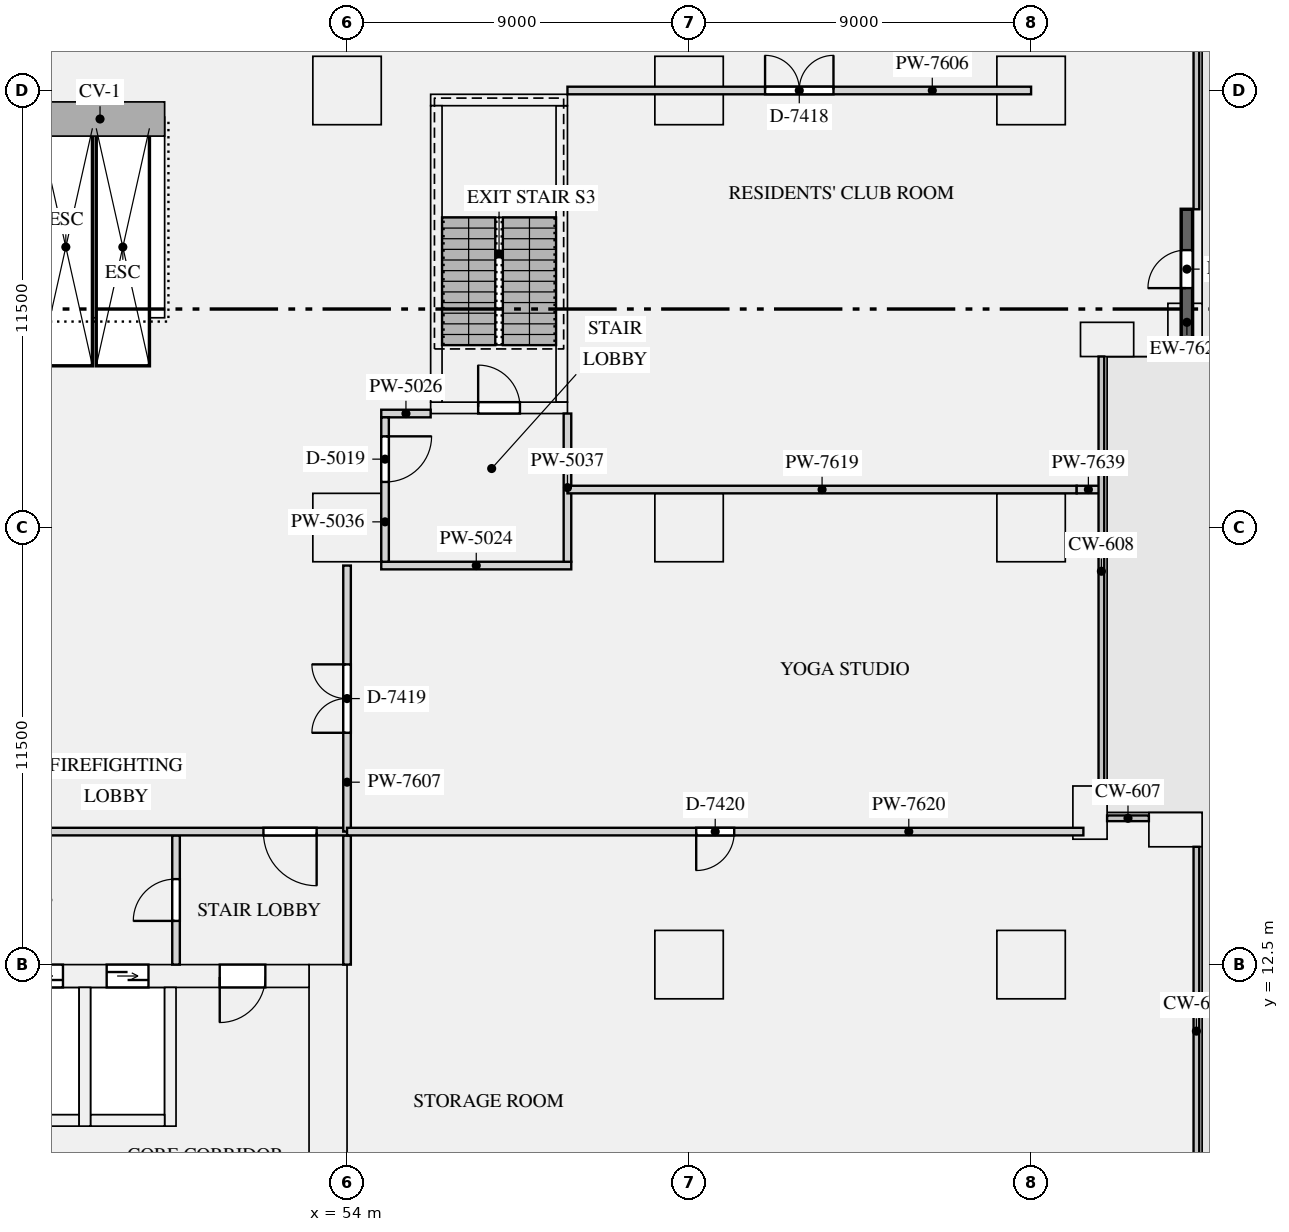
"""IFC4 building model, lengths in metres.
Left out: names, types, materials, properties, quantities, classifications, styles, units other than length and angle.
Written with IfcOpenShell. Run it as: python <this file> out.ifc"""

import sys

from ifc_helpers import new_model, si_unit, direction, frame, frame_2d, origin, origin_2d, place, context, subcontext, project, spatial, rectangle, extrude, element, fill, save


model = new_model("IFC4")
c1 = context("Model", 3, precision=1e-05, world=origin(), true_north=direction((0.0, 1.0)))
c2 = subcontext(c1, "Body", "Model", "MODEL_VIEW")
j1 = project(units=[si_unit("LENGTHUNIT", "METRE"), si_unit("PLANEANGLEUNIT", "RADIAN")], contexts=[c1])
p1 = place(None, origin())
s1 = spatial("IfcSite", under=j1, at=p1, CompositionType="ELEMENT")
p2 = place(p1, origin())
s2 = spatial("IfcBuilding", under=s1, at=p2, CompositionType="ELEMENT")
p3 = place(p2, frame((0.0, 0.0, 11.0)))
s3 = spatial("IfcBuildingStorey", under=s2, at=p3, CompositionType="ELEMENT", Elevation=11.0)
for number, where, z_axis, x_axis in (
    (1, (75.8, 16.05, 0.0), (0.0, 0.0, 1.0), (-1.0, 0.0, 0.0)),
    (2, (73.55, 16.5, 0.0), (0.0, 0.0, 1.0), (0.0, 1.0, 0.0)),
    (3, (74.0, 28.95, 0.0), (0.0, 0.0, 1.0), (1.0, 0.0, 0.0)),
    (4, (76.05, 29.2, 0.0), (0.0, 0.0, 1.0), (0.0, 1.0, 0.0)),
):
    element("IfcColumn", number, at=place(p3, frame(where, z_axis=z_axis, x_axis=x_axis)), inside=s3, PredefinedType="USERDEFINED", context=c2, shape_type="SweptSolid", body=[
        extrude(rectangle(XDim=1.4, YDim=0.9, at=origin_2d()), origin(), (0.0, 0.0, 1.0), 4.5),
    ])
for number, where, z_axis, x_axis in (
    (5, (54.0, 24.0, 0.0), (0.0, 0.0, 1.0), (1.0, 0.0, 0.0)),
    (6, (54.0, 35.5, 0.0), (0.0, 0.0, 1.0), (1.0, 0.0, 0.0)),
    (7, (63.0, 12.5, 0.0), (0.0, 0.0, 1.0), (1.0, 0.0, 0.0)),
    (8, (63.0, 24.0, 0.0), (0.0, 0.0, 1.0), (1.0, 0.0, 0.0)),
    (9, (63.0, 35.5, 0.0), (0.0, 0.0, 1.0), (1.0, 0.0, 0.0)),
    (10, (72.0, 12.5, 0.0), (0.0, 0.0, 1.0), (1.0, 0.0, 0.0)),
    (11, (72.0, 24.0, 0.0), (0.0, 0.0, 1.0), (1.0, 0.0, 0.0)),
    (12, (72.0, 35.5, 0.0), (0.0, 0.0, 1.0), (1.0, 0.0, 0.0)),
):
    element("IfcColumn", number, at=place(p3, frame(where, z_axis=z_axis, x_axis=x_axis)), inside=s3, PredefinedType="COLUMN", context=c2, shape_type="SweptSolid", body=[
        extrude(rectangle(XDim=1.8, YDim=1.8, at=origin_2d()), origin(), (0.0, 0.0, 1.0), 4.5),
    ])
p4 = place(p3, frame((53.5, 0.0, 0.0), z_axis=(0.0, 0.0, 1.0), x_axis=(0.0, 1.0, 0.0)))
e13 = element("IfcWall", 13, at=p4, inside=s3, PredefinedType="SHEAR", context=c2, shape_type="SweptSolid", body=[
    extrude(rectangle(XDim=12.5, YDim=1.0, at=frame_2d((6.25, 0.0))), origin(), (0.0, 0.0, 1.0), 4.5),
])
p5 = place(p3, frame((19.0, 12.2, 0.0), z_axis=(0.0, 0.0, 1.0), x_axis=(1.0, 0.0, 0.0)))
e14 = element("IfcWall", 14, at=p5, inside=s3, PredefinedType="SHEAR", context=c2, shape_type="SweptSolid", body=[
    extrude(rectangle(XDim=34.0, YDim=0.6, at=frame_2d((17.0, 0.0))), origin(), (0.0, 0.0, 1.0), 4.5),
])
p6 = place(p5, frame((4.475, 0.0, 0.0)))
e15 = element("IfcOpeningElement", 15, at=p6, cuts=e14, PredefinedType="OPENING", context=c2, shape_type="SweptSolid", body=[
    extrude(rectangle(XDim=1.2, YDim=2.1, at=frame_2d((0.6, 1.05))), frame((0.0, 0.31, 0.0), z_axis=(0.0, -1.0, 0.0), x_axis=(1.0, 0.0, 0.0)), (0.0, 0.0, 1.0), 0.62),
])
p7 = place(p5, frame((7.325, 0.0, 0.0)))
e16 = element("IfcOpeningElement", 16, at=p7, cuts=e14, PredefinedType="OPENING", context=c2, shape_type="SweptSolid", body=[
    extrude(rectangle(XDim=1.2, YDim=2.1, at=frame_2d((0.6, 1.05))), frame((0.0, 0.31, 0.0), z_axis=(0.0, -1.0, 0.0), x_axis=(1.0, 0.0, 0.0)), (0.0, 0.0, 1.0), 0.62),
])
p8 = place(p5, frame((10.175, 0.0, 0.0)))
e17 = element("IfcOpeningElement", 17, at=p8, cuts=e14, PredefinedType="OPENING", context=c2, shape_type="SweptSolid", body=[
    extrude(rectangle(XDim=1.2, YDim=2.1, at=frame_2d((0.6, 1.05))), frame((0.0, 0.31, 0.0), z_axis=(0.0, -1.0, 0.0), x_axis=(1.0, 0.0, 0.0)), (0.0, 0.0, 1.0), 0.62),
])
p9 = place(p5, frame((13.025, 0.0, 0.0)))
e18 = element("IfcOpeningElement", 18, at=p9, cuts=e14, PredefinedType="OPENING", context=c2, shape_type="SweptSolid", body=[
    extrude(rectangle(XDim=1.2, YDim=2.1, at=frame_2d((0.6, 1.05))), frame((0.0, 0.31, 0.0), z_axis=(0.0, -1.0, 0.0), x_axis=(1.0, 0.0, 0.0)), (0.0, 0.0, 1.0), 0.62),
])
p10 = place(p5, frame((15.875, 0.0, 0.0)))
e19 = element("IfcOpeningElement", 19, at=p10, cuts=e14, PredefinedType="OPENING", context=c2, shape_type="SweptSolid", body=[
    extrude(rectangle(XDim=1.2, YDim=2.1, at=frame_2d((0.6, 1.05))), frame((0.0, 0.31, 0.0), z_axis=(0.0, -1.0, 0.0), x_axis=(1.0, 0.0, 0.0)), (0.0, 0.0, 1.0), 0.62),
])
p11 = place(p5, frame((24.175, 0.0, 0.0)))
e20 = element("IfcOpeningElement", 20, at=p11, cuts=e14, PredefinedType="OPENING", context=c2, shape_type="SweptSolid", body=[
    extrude(rectangle(XDim=1.1, YDim=2.1, at=frame_2d((0.55, 1.05))), frame((0.0, 0.31, 0.0), z_axis=(0.0, -1.0, 0.0), x_axis=(1.0, 0.0, 0.0)), (0.0, 0.0, 1.0), 0.62),
])
p12 = place(p5, frame((26.425, 0.0, 0.0)))
e21 = element("IfcOpeningElement", 21, at=p12, cuts=e14, PredefinedType="OPENING", context=c2, shape_type="SweptSolid", body=[
    extrude(rectangle(XDim=1.1, YDim=2.1, at=frame_2d((0.55, 1.05))), frame((0.0, 0.31, 0.0), z_axis=(0.0, -1.0, 0.0), x_axis=(1.0, 0.0, 0.0)), (0.0, 0.0, 1.0), 0.62),
])
p13 = place(p5, frame((28.675, 0.0, 0.0)))
e22 = element("IfcOpeningElement", 22, at=p13, cuts=e14, PredefinedType="OPENING", context=c2, shape_type="SweptSolid", body=[
    extrude(rectangle(XDim=1.1, YDim=2.1, at=frame_2d((0.55, 1.05))), frame((0.0, 0.31, 0.0), z_axis=(0.0, -1.0, 0.0), x_axis=(1.0, 0.0, 0.0)), (0.0, 0.0, 1.0), 0.62),
])
p14 = place(p5, frame((1.15, 0.0, 0.0)))
e23 = element("IfcOpeningElement", 23, at=p14, cuts=e14, PredefinedType="OPENING", context=c2, shape_type="SweptSolid", body=[
    extrude(rectangle(XDim=1.2, YDim=2.1, at=frame_2d((0.6, 1.05))), frame((0.0, 0.31, 0.0), z_axis=(0.0, -1.0, 0.0), x_axis=(1.0, 0.0, 0.0)), (0.0, 0.0, 1.0), 0.62),
])
p15 = place(p5, frame((31.65, 0.0, 0.0)))
e24 = element("IfcOpeningElement", 24, at=p15, cuts=e14, PredefinedType="OPENING", context=c2, shape_type="SweptSolid", body=[
    extrude(rectangle(XDim=1.2, YDim=2.1, at=frame_2d((0.6, 1.05))), frame((0.0, 0.31, 0.0), z_axis=(0.0, -1.0, 0.0), x_axis=(1.0, 0.0, 0.0)), (0.0, 0.0, 1.0), 0.62),
])
for number, where, z_axis, x_axis in (
    (25, (45.0, 8.4, 0.0), (0.0, 0.0, 1.0), (1.0, 0.0, 0.0)),
    (26, (47.25, 8.4, 0.0), (0.0, 0.0, 1.0), (1.0, 0.0, 0.0)),
):
    element("IfcWall", number, at=place(p3, frame(where, z_axis=z_axis, x_axis=x_axis)), inside=s3, PredefinedType="SHEAR", context=c2, shape_type="SweptSolid", body=[
        extrude(rectangle(XDim=1.95, YDim=0.3, at=frame_2d((0.975, 0.0))), origin(), (0.0, 0.0, 1.0), 4.5),
    ])
for number, where, z_axis, x_axis in (
    (27, (47.1, 8.25, 0.0), (0.0, 0.0, 1.0), (0.0, 1.0, 0.0)),
    (28, (49.35, 8.25, 0.0), (0.0, 0.0, 1.0), (0.0, 1.0, 0.0)),
):
    element("IfcWall", number, at=place(p3, frame(where, z_axis=z_axis, x_axis=x_axis)), inside=s3, PredefinedType="SHEAR", context=c2, shape_type="SweptSolid", body=[
        extrude(rectangle(XDim=3.65, YDim=0.3, at=frame_2d((1.825, 0.0))), origin(), (0.0, 0.0, 1.0), 4.5),
    ])
p16 = place(p3, frame((56.2, 27.15, 0.0), z_axis=(0.0, 0.0, 1.0), x_axis=(1.0, 0.0, 0.0)))
e29 = element("IfcWall", 29, at=p16, inside=s3, PredefinedType="SHEAR", context=c2, shape_type="SweptSolid", body=[
    extrude(rectangle(XDim=3.6, YDim=0.3, at=frame_2d((1.8, 0.0))), origin(), (0.0, 0.0, 1.0), 4.5),
])
p17 = place(p16, frame((1.25, 0.0, 0.0)))
e30 = element("IfcOpeningElement", 30, at=p17, cuts=e29, PredefinedType="OPENING", context=c2, shape_type="SweptSolid", body=[
    extrude(rectangle(XDim=1.1, YDim=2.1, at=frame_2d((0.55, 1.05))), frame((0.0, 0.16, 0.0), z_axis=(0.0, -1.0, 0.0), x_axis=(1.0, 0.0, 0.0)), (0.0, 0.0, 1.0), 0.32),
])
p18 = place(p3, frame((56.2, 35.25, 0.0), z_axis=(0.0, 0.0, 1.0), x_axis=(1.0, 0.0, 0.0)))
e31 = element("IfcWall", 31, at=p18, inside=s3, PredefinedType="SHEAR", context=c2, shape_type="SweptSolid", body=[
    extrude(rectangle(XDim=3.6, YDim=0.3, at=frame_2d((1.8, 0.0))), origin(), (0.0, 0.0, 1.0), 4.5),
])
for number, where, z_axis, x_axis in (
    (32, (56.35, 27.3, 0.0), (0.0, 0.0, 1.0), (0.0, 1.0, 0.0)),
    (33, (59.65, 27.3, 0.0), (0.0, 0.0, 1.0), (0.0, 1.0, 0.0)),
):
    element("IfcWall", number, at=place(p3, frame(where, z_axis=z_axis, x_axis=x_axis)), inside=s3, PredefinedType="SHEAR", context=c2, shape_type="SweptSolid", body=[
        extrude(rectangle(XDim=7.8, YDim=0.3, at=frame_2d((3.9, 0.0))), origin(), (0.0, 0.0, 1.0), 4.5),
    ])
p19 = place(p3, frame((54.9, 23.0, 0.0), z_axis=(0.0, 0.0, 1.0), x_axis=(1.0, 0.0, 0.0)))
e34 = element("IfcWall", 34, at=p19, inside=s3, PredefinedType="PARTITIONING", context=c2, shape_type="SweptSolid", body=[
    extrude(rectangle(XDim=5.0, YDim=0.2, at=frame_2d((2.5, 0.0))), origin(), (0.0, 0.0, 1.0), 3.9),
])
p20 = place(p3, frame((54.9, 27.0, 0.0), z_axis=(0.0, 0.0, 1.0), x_axis=(1.0, 0.0, 0.0)))
e35 = element("IfcWall", 35, at=p20, inside=s3, PredefinedType="PARTITIONING", context=c2, shape_type="SweptSolid", body=[
    extrude(rectangle(XDim=1.3, YDim=0.2, at=frame_2d((0.65, 0.0))), origin(), (0.0, 0.0, 1.0), 3.9),
])
p21 = place(p3, frame((49.5, 12.5, 0.0), z_axis=(0.0, 0.0, 1.0), x_axis=(0.0, 1.0, 0.0)))
e36 = element("IfcWall", 36, at=p21, inside=s3, PredefinedType="PARTITIONING", context=c2, shape_type="SweptSolid", body=[
    extrude(rectangle(XDim=3.4, YDim=0.2, at=frame_2d((1.7, 0.0))), origin(), (0.0, 0.0, 1.0), 3.9),
])
p22 = place(p21, frame((1.15, 0.0, 0.0)))
e37 = element("IfcOpeningElement", 37, at=p22, cuts=e36, PredefinedType="OPENING", context=c2, shape_type="SweptSolid", body=[
    extrude(rectangle(XDim=1.1, YDim=2.1, at=frame_2d((0.55, 1.05))), frame((0.0, 0.11, 0.0), z_axis=(0.0, -1.0, 0.0), x_axis=(1.0, 0.0, 0.0)), (0.0, 0.0, 1.0), 0.22),
])
p23 = place(p3, frame((54.0, 12.5, 0.0), z_axis=(0.0, 0.0, 1.0), x_axis=(0.0, 1.0, 0.0)))
e38 = element("IfcWall", 38, at=p23, inside=s3, PredefinedType="PARTITIONING", context=c2, shape_type="SweptSolid", body=[
    extrude(rectangle(XDim=3.4, YDim=0.2, at=frame_2d((1.7, 0.0))), origin(), (0.0, 0.0, 1.0), 3.9),
])
p24 = place(p3, frame((55.0, 23.1, 0.0), z_axis=(0.0, 0.0, 1.0), x_axis=(0.0, 1.0, 0.0)))
e39 = element("IfcWall", 39, at=p24, inside=s3, PredefinedType="PARTITIONING", context=c2, shape_type="SweptSolid", body=[
    extrude(rectangle(XDim=3.8, YDim=0.2, at=frame_2d((1.9, 0.0))), origin(), (0.0, 0.0, 1.0), 3.9),
])
p25 = place(p24, frame((2.1, 0.0, 0.0)))
e40 = element("IfcOpeningElement", 40, at=p25, cuts=e39, PredefinedType="OPENING", context=c2, shape_type="SweptSolid", body=[
    extrude(rectangle(XDim=1.2, YDim=2.1, at=frame_2d((0.6, 1.05))), frame((0.0, 0.11, 0.0), z_axis=(0.0, -1.0, 0.0), x_axis=(1.0, 0.0, 0.0)), (0.0, 0.0, 1.0), 0.22),
])
p26 = place(p3, frame((59.8, 23.1, 0.0), z_axis=(0.0, 0.0, 1.0), x_axis=(0.0, 1.0, 0.0)))
e41 = element("IfcWall", 41, at=p26, inside=s3, PredefinedType="PARTITIONING", context=c2, shape_type="SweptSolid", body=[
    extrude(rectangle(XDim=3.9, YDim=0.2, at=frame_2d((1.95, 0.0))), origin(), (0.0, 0.0, 1.0), 3.9),
])
p27 = place(p3, frame((17.9, 16.0, 0.0), z_axis=(0.0, 0.0, 1.0), x_axis=(1.0, 0.0, 0.0)))
e42 = element("IfcWall", 42, at=p27, inside=s3, PredefinedType="PARTITIONING", context=c2, shape_type="SweptSolid", body=[
    extrude(rectangle(XDim=36.2, YDim=0.2, at=frame_2d((18.1, 0.0))), origin(), (0.0, 0.0, 1.0), 3.9),
])
p28 = place(p27, frame((0.9, 0.0, 0.0)))
e43 = element("IfcOpeningElement", 43, at=p28, cuts=e42, PredefinedType="OPENING", context=c2, shape_type="SweptSolid", body=[
    extrude(rectangle(XDim=1.4, YDim=2.1, at=frame_2d((0.7, 1.05))), frame((0.0, 0.11, 0.0), z_axis=(0.0, -1.0, 0.0), x_axis=(1.0, 0.0, 0.0)), (0.0, 0.0, 1.0), 0.22),
])
p29 = place(p27, frame((33.9, 0.0, 0.0)))
e44 = element("IfcOpeningElement", 44, at=p29, cuts=e42, PredefinedType="OPENING", context=c2, shape_type="SweptSolid", body=[
    extrude(rectangle(XDim=1.4, YDim=2.1, at=frame_2d((0.7, 1.05))), frame((0.0, 0.11, 0.0), z_axis=(0.0, -1.0, 0.0), x_axis=(1.0, 0.0, 0.0)), (0.0, 0.0, 1.0), 0.22),
])
p30 = place(p3, frame((59.8, 35.5, 0.0), z_axis=(0.0, 0.0, 1.0), x_axis=(1.0, 0.0, 0.0)))
e45 = element("IfcWall", 45, at=p30, inside=s3, PredefinedType="PARTITIONING", context=c2, shape_type="SweptSolid", body=[
    extrude(rectangle(XDim=12.2, YDim=0.2, at=frame_2d((6.1, 0.0))), origin(), (0.0, 0.0, 1.0), 3.9),
])
p31 = place(p30, frame((5.2, 0.0, 0.0)))
e46 = element("IfcOpeningElement", 46, at=p31, cuts=e45, PredefinedType="OPENING", context=c2, shape_type="SweptSolid", body=[
    extrude(rectangle(XDim=1.8, YDim=2.4, at=frame_2d((0.9, 1.2))), frame((0.0, 0.11, 0.0), z_axis=(0.0, -1.0, 0.0), x_axis=(1.0, 0.0, 0.0)), (0.0, 0.0, 1.0), 0.22),
])
p32 = place(p3, frame((54.0, 16.0, 0.0), z_axis=(0.0, 0.0, 1.0), x_axis=(0.0, 1.0, 0.0)))
e47 = element("IfcWall", 47, at=p32, inside=s3, PredefinedType="PARTITIONING", context=c2, shape_type="SweptSolid", body=[
    extrude(rectangle(XDim=7.0, YDim=0.2, at=frame_2d((3.5, 0.0))), origin(), (0.0, 0.0, 1.0), 3.9),
])
p33 = place(p32, frame((2.6, 0.0, 0.0)))
e48 = element("IfcOpeningElement", 48, at=p33, cuts=e47, PredefinedType="OPENING", context=c2, shape_type="SweptSolid", body=[
    extrude(rectangle(XDim=1.8, YDim=2.4, at=frame_2d((0.9, 1.2))), frame((0.0, 0.11, 0.0), z_axis=(0.0, -1.0, 0.0), x_axis=(1.0, 0.0, 0.0)), (0.0, 0.0, 1.0), 0.22),
])
p34 = place(p3, frame((59.8, 25.0, 0.0), z_axis=(0.0, 0.0, 1.0), x_axis=(1.0, 0.0, 0.0)))
e49 = element("IfcWall", 49, at=p34, inside=s3, PredefinedType="PARTITIONING", context=c2, shape_type="SweptSolid", body=[
    extrude(rectangle(XDim=13.4, YDim=0.2, at=frame_2d((6.7, 0.0))), origin(), (0.0, 0.0, 1.0), 3.9),
])
p35 = place(p3, frame((54.0, 16.0, 0.0), z_axis=(0.0, 0.0, 1.0), x_axis=(1.0, 0.0, 0.0)))
e50 = element("IfcWall", 50, at=p35, inside=s3, PredefinedType="PARTITIONING", context=c2, shape_type="SweptSolid", body=[
    extrude(rectangle(XDim=19.376, YDim=0.2, at=frame_2d((9.688, 0.0))), origin(), (0.0, 0.0, 1.0), 3.9),
])
p36 = place(p35, frame((9.188, 0.0, 0.0)))
e51 = element("IfcOpeningElement", 51, at=p36, cuts=e50, PredefinedType="OPENING", context=c2, shape_type="SweptSolid", body=[
    extrude(rectangle(XDim=1.0, YDim=2.1, at=frame_2d((0.5, 1.05))), frame((0.0, 0.11, 0.0), z_axis=(0.0, -1.0, 0.0), x_axis=(1.0, 0.0, 0.0)), (0.0, 0.0, 1.0), 0.22),
])
p37 = place(p3, frame((76.1, 28.5, 0.0), z_axis=(0.0, 0.0, 1.0), x_axis=(0.0, 1.0, 0.0)))
e52 = element("IfcWall", 52, at=p37, inside=s3, PredefinedType="SOLIDWALL", context=c2, shape_type="SweptSolid", body=[
    extrude(rectangle(XDim=3.875, YDim=0.3, at=frame_2d((1.938, 0.0))), origin(), (0.0, 0.0, 1.0), 3.9),
])
p38 = place(p37, frame((1.8, 0.0, 0.0)))
e53 = element("IfcOpeningElement", 53, at=p38, cuts=e52, PredefinedType="OPENING", context=c2, shape_type="SweptSolid", body=[
    extrude(rectangle(XDim=1.0, YDim=2.1, at=frame_2d((0.5, 1.05))), frame((0.0, 0.16, 0.0), z_axis=(0.0, -1.0, 0.0), x_axis=(1.0, 0.0, 0.0)), (0.0, 0.0, 1.0), 0.32),
])
p39 = place(p3, frame((73.2, 25.0, 0.0), z_axis=(0.0, 0.0, 1.0), x_axis=(1.0, 0.0, 0.0)))
e54 = element("IfcWall", 54, at=p39, inside=s3, PredefinedType="PARTITIONING", context=c2, shape_type="SweptSolid", body=[
    extrude(rectangle(XDim=0.615, YDim=0.2, at=frame_2d((0.308, 0.0))), origin(), (0.0, 0.0, 1.0), 3.9),
])
p40 = place(p12, origin())
e55 = element("IfcDoor", 55, at=p40, inside=s3, OperationType="DOUBLE_DOOR_SLIDING", PredefinedType="DOOR", context=c2, shape_type="SweptSolid", body=[
    extrude(rectangle(XDim=1.1, YDim=2.1, at=frame_2d((0.55, 1.05))), frame((0.0, 0.025, 0.0), z_axis=(0.0, -1.0, 0.0), x_axis=(1.0, 0.0, 0.0)), (0.0, 0.0, 1.0), 0.05),
])
fill(e21, e55)
p41 = place(p13, origin())
e56 = element("IfcDoor", 56, at=p41, inside=s3, OperationType="DOUBLE_DOOR_SLIDING", PredefinedType="DOOR", context=c2, shape_type="SweptSolid", body=[
    extrude(rectangle(XDim=1.1, YDim=2.1, at=frame_2d((0.55, 1.05))), frame((0.0, 0.025, 0.0), z_axis=(0.0, -1.0, 0.0), x_axis=(1.0, 0.0, 0.0)), (0.0, 0.0, 1.0), 0.05),
])
fill(e22, e56)
p42 = place(p17, origin())
e57 = element("IfcDoor", 57, at=p42, inside=s3, OperationType="SINGLE_SWING_LEFT", PredefinedType="DOOR", context=c2, shape_type="SweptSolid", body=[
    extrude(rectangle(XDim=1.1, YDim=2.1, at=frame_2d((0.55, 1.05))), frame((0.0, 0.025, 0.0), z_axis=(0.0, -1.0, 0.0), x_axis=(1.0, 0.0, 0.0)), (0.0, 0.0, 1.0), 0.05),
])
fill(e30, e57)
p43 = place(p25, frame((1.2, 0.0, 0.0), z_axis=(0.0, 0.0, 1.0), x_axis=(-1.0, 0.0, 0.0)))
e58 = element("IfcDoor", 58, at=p43, inside=s3, OperationType="SINGLE_SWING_LEFT", PredefinedType="DOOR", context=c2, shape_type="SweptSolid", body=[
    extrude(rectangle(XDim=1.2, YDim=2.1, at=frame_2d((0.6, 1.05))), frame((0.0, 0.025, 0.0), z_axis=(0.0, -1.0, 0.0), x_axis=(1.0, 0.0, 0.0)), (0.0, 0.0, 1.0), 0.05),
])
fill(e40, e58)
p44 = place(p15, frame((1.2, 0.0, 0.0), z_axis=(0.0, 0.0, 1.0), x_axis=(-1.0, 0.0, 0.0)))
e59 = element("IfcDoor", 59, at=p44, inside=s3, OperationType="SINGLE_SWING_RIGHT", PredefinedType="DOOR", context=c2, shape_type="SweptSolid", body=[
    extrude(rectangle(XDim=1.2, YDim=2.1, at=frame_2d((0.6, 1.05))), frame((0.0, 0.025, 0.0), z_axis=(0.0, -1.0, 0.0), x_axis=(1.0, 0.0, 0.0)), (0.0, 0.0, 1.0), 0.05),
])
fill(e24, e59)
p45 = place(p22, origin())
e60 = element("IfcDoor", 60, at=p45, inside=s3, OperationType="SINGLE_SWING_LEFT", PredefinedType="DOOR", context=c2, shape_type="SweptSolid", body=[
    extrude(rectangle(XDim=1.1, YDim=2.1, at=frame_2d((0.55, 1.05))), frame((0.0, 0.025, 0.0), z_axis=(0.0, -1.0, 0.0), x_axis=(1.0, 0.0, 0.0)), (0.0, 0.0, 1.0), 0.05),
])
fill(e37, e60)
p46 = place(p29, frame((1.4, 0.0, 0.0), z_axis=(0.0, 0.0, 1.0), x_axis=(-1.0, 0.0, 0.0)))
e61 = element("IfcDoor", 61, at=p46, inside=s3, OperationType="SINGLE_SWING_LEFT", PredefinedType="DOOR", context=c2, shape_type="SweptSolid", body=[
    extrude(rectangle(XDim=1.4, YDim=2.1, at=frame_2d((0.7, 1.05))), frame((0.0, 0.025, 0.0), z_axis=(0.0, -1.0, 0.0), x_axis=(1.0, 0.0, 0.0)), (0.0, 0.0, 1.0), 0.05),
])
fill(e44, e61)
p47 = place(p38, origin())
e62 = element("IfcDoor", 62, at=p47, inside=s3, OperationType="SINGLE_SWING_LEFT", PredefinedType="DOOR", context=c2, shape_type="SweptSolid", body=[
    extrude(rectangle(XDim=1.0, YDim=2.1, at=frame_2d((0.5, 1.05))), frame((0.0, 0.025, 0.0), z_axis=(0.0, -1.0, 0.0), x_axis=(1.0, 0.0, 0.0)), (0.0, 0.0, 1.0), 0.05),
])
fill(e53, e62)
p48 = place(p31, origin())
e63 = element("IfcDoor", 63, at=p48, inside=s3, OperationType="DOUBLE_DOOR_SINGLE_SWING", PredefinedType="DOOR", context=c2, shape_type="SweptSolid", body=[
    extrude(rectangle(XDim=1.8, YDim=2.4, at=frame_2d((0.9, 1.2))), frame((0.0, 0.025, 0.0), z_axis=(0.0, -1.0, 0.0), x_axis=(1.0, 0.0, 0.0)), (0.0, 0.0, 1.0), 0.05),
])
fill(e46, e63)
p49 = place(p33, origin())
e64 = element("IfcDoor", 64, at=p49, inside=s3, OperationType="DOUBLE_DOOR_SINGLE_SWING", PredefinedType="DOOR", context=c2, shape_type="SweptSolid", body=[
    extrude(rectangle(XDim=1.8, YDim=2.4, at=frame_2d((0.9, 1.2))), frame((0.0, 0.025, 0.0), z_axis=(0.0, -1.0, 0.0), x_axis=(1.0, 0.0, 0.0)), (0.0, 0.0, 1.0), 0.05),
])
fill(e48, e64)
p50 = place(p36, frame((1.0, 0.0, 0.0), z_axis=(0.0, 0.0, 1.0), x_axis=(-1.0, 0.0, 0.0)))
e65 = element("IfcDoor", 65, at=p50, inside=s3, OperationType="SINGLE_SWING_RIGHT", PredefinedType="DOOR", context=c2, shape_type="SweptSolid", body=[
    extrude(rectangle(XDim=1.0, YDim=2.1, at=frame_2d((0.5, 1.05))), frame((0.0, 0.025, 0.0), z_axis=(0.0, -1.0, 0.0), x_axis=(1.0, 0.0, 0.0)), (0.0, 0.0, 1.0), 0.05),
])
fill(e51, e65)
save(model, sys.argv[1])
